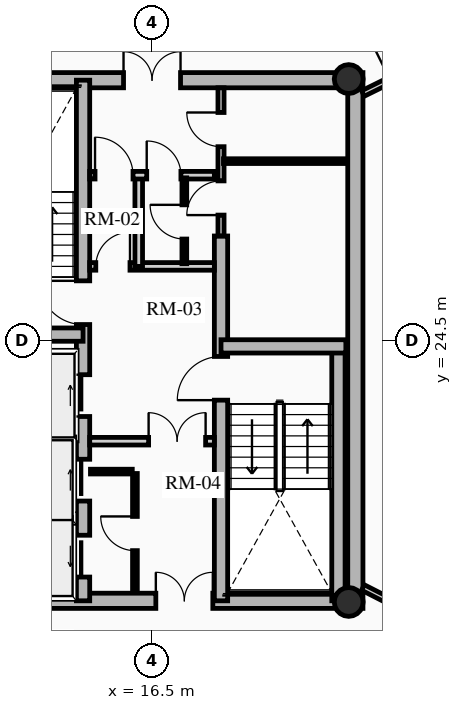
"""IFC4 building model, lengths in metres.
Left out: names, types, materials, properties, quantities, classifications, styles, units other than length and angle.
Written with IfcOpenShell. Run it as: python <this file> out.ifc"""

import sys

from ifc_helpers import new_model, si_unit, direction, frame, frame_2d, origin, origin_2d, place, context, subcontext, project, spatial, rectangle, hollow_circle, extrude, source, transform, mapped, element, fill, save


model = new_model("IFC4")
c1 = context("Model", 3, precision=1e-05, world=origin(), true_north=direction((0.0, 1.0)))
c2 = subcontext(c1, "Body", "Model", "MODEL_VIEW")
j1 = project(units=[si_unit("LENGTHUNIT", "METRE"), si_unit("PLANEANGLEUNIT", "RADIAN")], contexts=[c1])
p1 = place(None, origin())
s1 = spatial("IfcSite", under=j1, at=p1, CompositionType="ELEMENT")
p2 = place(p1, origin())
s2 = spatial("IfcBuilding", under=s1, at=p2, CompositionType="ELEMENT")
p3 = place(p2, frame((0.0, 0.0, 180.7)))
s3 = spatial("IfcBuildingStorey", under=s2, at=p3, CompositionType="ELEMENT", Elevation=180.7)
p4 = place(p3, frame((21.85, 17.45, 0.0), z_axis=(0.0, 0.0, 1.0), x_axis=(0.0, 1.0, 0.0)))
e1 = element("IfcWall", 1, at=p4, inside=s3, PredefinedType="SHEAR", context=c2, shape_type="SweptSolid", body=[
    extrude(rectangle(XDim=14.1, YDim=0.4, at=frame_2d((7.05, 0.0))), origin(), (0.0, 0.0, 1.0), 2.91),
])
p5 = place(p3, frame((11.15, 17.65, 0.0), z_axis=(0.0, 0.0, 1.0), x_axis=(1.0, 0.0, 0.0)))
e2 = element("IfcWall", 2, at=p5, inside=s3, PredefinedType="SHEAR", context=c2, shape_type="SweptSolid", body=[
    extrude(rectangle(XDim=10.7, YDim=0.4, at=frame_2d((5.35, 0.0))), origin(), (0.0, 0.0, 1.0), 2.91),
])
m1 = source(origin(), c2, "Body", "SweptSolid", [
    extrude(rectangle(XDim=1.5, YDim=2.02, at=frame_2d((0.75, 1.01))), frame((0.0, 0.21, 0.0), z_axis=(0.0, -1.0, 0.0), x_axis=(1.0, 0.0, 0.0)), (0.0, 0.0, 1.0), 0.42),
])
p6 = place(p5, frame((5.45, 0.0, 0.0)))
e3 = element("IfcOpeningElement", 3, at=p6, cuts=e2, PredefinedType="OPENING", context=c2, shape_type="MappedRepresentation", body=[
    mapped(m1, transform((0.0, 0.0, 0.0), x_axis=(1.0, 0.0, 0.0), y_axis=(0.0, 1.0, 0.0), z_axis=(0.0, 0.0, 1.0), scale=1.0)),
])
p7 = place(p3, frame((11.15, 31.35, 0.0), z_axis=(0.0, 0.0, 1.0), x_axis=(1.0, 0.0, 0.0)))
e4 = element("IfcWall", 4, at=p7, inside=s3, PredefinedType="SHEAR", context=c2, shape_type="SweptSolid", body=[
    extrude(rectangle(XDim=10.7, YDim=0.4, at=frame_2d((5.35, 0.0))), origin(), (0.0, 0.0, 1.0), 2.91),
])
p8 = place(p7, frame((4.6, 0.0, 0.0)))
e5 = element("IfcOpeningElement", 5, at=p8, cuts=e4, PredefinedType="OPENING", context=c2, shape_type="MappedRepresentation", body=[
    mapped(m1, transform((0.0, 0.0, 0.0), x_axis=(1.0, 0.0, 0.0), y_axis=(0.0, 1.0, 0.0), z_axis=(0.0, 0.0, 1.0), scale=1.0)),
])
p9 = place(p3, frame((14.685, 17.65, 0.0), z_axis=(0.0, 0.0, 1.0), x_axis=(0.0, 1.0, 0.0)))
e6 = element("IfcWall", 6, at=p9, inside=s3, PredefinedType="SHEAR", context=c2, shape_type="SweptSolid", body=[
    extrude(rectangle(XDim=13.7, YDim=0.35, at=frame_2d((6.85, 0.0))), origin(), (0.0, 0.0, 1.0), 2.91),
])
m2 = source(origin(), c2, "Body", "SweptSolid", [
    extrude(rectangle(XDim=1.1, YDim=2.015, at=frame_2d((0.55, 1.007))), frame((0.0, 0.185, 0.0), z_axis=(0.0, -1.0, 0.0), x_axis=(1.0, 0.0, 0.0)), (0.0, 0.0, 1.0), 0.37),
])
p10 = place(p9, frame((4.85, 0.0, 0.0)))
e7 = element("IfcOpeningElement", 7, at=p10, cuts=e6, PredefinedType="OPENING", context=c2, shape_type="MappedRepresentation", body=[
    mapped(m2, transform((0.0, 0.0, 0.0), x_axis=(1.0, 0.0, 0.0), y_axis=(0.0, 1.0, 0.0), z_axis=(0.0, 0.0, 1.0), scale=1.0)),
])
p11 = place(p9, frame((0.625, 0.0, 0.0)))
e8 = element("IfcOpeningElement", 8, at=p11, cuts=e6, PredefinedType="OPENING", context=c2, shape_type="MappedRepresentation", body=[
    mapped(m2, transform((0.0, 0.0, 0.0), x_axis=(1.0, 0.0, 0.0), y_axis=(0.0, 1.0, 0.0), z_axis=(0.0, 0.0, 1.0), scale=1.0)),
])
p12 = place(p9, frame((2.625, 0.0, 0.0)))
e9 = element("IfcOpeningElement", 9, at=p12, cuts=e6, PredefinedType="OPENING", context=c2, shape_type="MappedRepresentation", body=[
    mapped(m2, transform((0.0, 0.0, 0.0), x_axis=(1.0, 0.0, 0.0), y_axis=(0.0, 1.0, 0.0), z_axis=(0.0, 0.0, 1.0), scale=1.0)),
])
m3 = source(origin(), c2, "Body", "SweptSolid", [
    extrude(rectangle(XDim=1.15, YDim=2.02, at=frame_2d((0.575, 1.01))), frame((0.0, 0.185, 0.0), z_axis=(0.0, -1.0, 0.0), x_axis=(1.0, 0.0, 0.0)), (0.0, 0.0, 1.0), 0.37),
])
p13 = place(p9, frame((7.27, 0.0, 0.0)))
e10 = element("IfcOpeningElement", 10, at=p13, cuts=e6, PredefinedType="OPENING", context=c2, shape_type="MappedRepresentation", body=[
    mapped(m3, transform((0.0, 0.0, 0.0), x_axis=(1.0, 0.0, 0.0), y_axis=(0.0, 1.0, 0.0), z_axis=(0.0, 0.0, 1.0), scale=1.0)),
])
p14 = place(p3, frame((18.315, 17.65, 0.0), z_axis=(0.0, 0.0, 1.0), x_axis=(0.0, 1.0, 0.0)))
e11 = element("IfcWall", 11, at=p14, inside=s3, PredefinedType="SHEAR", context=c2, shape_type="SweptSolid", body=[
    extrude(rectangle(XDim=9.6, YDim=0.35, at=frame_2d((4.8, 0.0))), origin(), (0.0, 0.0, 1.0), 2.91),
])
p15 = place(p14, frame((5.28, 0.0, 0.0)))
e12 = element("IfcOpeningElement", 12, at=p15, cuts=e11, PredefinedType="OPENING", context=c2, shape_type="MappedRepresentation", body=[
    mapped(m3, transform((0.0, 0.0, 0.0), x_axis=(1.0, 0.0, 0.0), y_axis=(0.0, 1.0, 0.0), z_axis=(0.0, 0.0, 1.0), scale=1.0)),
])
p16 = place(p3, frame((11.4, 24.655, 0.0), z_axis=(0.0, 0.0, 1.0), x_axis=(1.0, 0.0, 0.0)))
e13 = element("IfcWall", 13, at=p16, inside=s3, PredefinedType="SHEAR", context=c2, shape_type="SweptSolid", body=[
    extrude(rectangle(XDim=3.285, YDim=0.35, at=frame_2d((1.643, 0.0))), origin(), (0.0, 0.0, 1.0), 2.91),
])
p17 = place(p3, frame((21.405, 17.65, 0.0), z_axis=(0.0, 0.0, 1.0), x_axis=(0.0, 1.0, 0.0)))
e14 = element("IfcWall", 14, at=p17, inside=s3, PredefinedType="SHEAR", context=c2, shape_type="SweptSolid", body=[
    extrude(rectangle(XDim=6.695, YDim=0.35, at=frame_2d((3.348, 0.0))), origin(), (0.0, 0.0, 1.0), 2.91),
])
p18 = place(p3, frame((18.315, 24.345, 0.0), z_axis=(0.0, 0.0, 1.0), x_axis=(1.0, 0.0, 0.0)))
e15 = element("IfcWall", 15, at=p18, inside=s3, PredefinedType="SHEAR", context=c2, shape_type="SweptSolid", body=[
    extrude(rectangle(XDim=3.285, YDim=0.35, at=frame_2d((1.643, 0.0))), origin(), (0.0, 0.0, 1.0), 2.91),
])
for number, where, z_axis, x_axis in (
    (16, (21.675, 17.62, 0.0), (0.0, 0.0, 1.0), (1.0, 0.0, 0.0)),
    (17, (21.675, 31.38, 0.0), (0.0, 0.0, 1.0), (1.0, 0.0, 0.0)),
):
    element("IfcColumn", number, at=place(p3, frame(where, z_axis=z_axis, x_axis=x_axis)), inside=s3, PredefinedType="COLUMN", context=c2, shape_type="SweptSolid", body=[
        extrude(hollow_circle(Radius=0.38, WallThickness=0.032, at=origin_2d()), origin(), (0.0, 0.0, 1.0), 2.91),
    ])
for number, where, z_axis, x_axis in (
    (18, (11.52, 21.8, 0.0), (0.0, 0.0, 1.0), (1.0, 0.0, 0.0)),
    (19, (11.52, 19.825, 0.0), (0.0, 0.0, 1.0), (1.0, 0.0, 0.0)),
):
    element("IfcWall", number, at=place(p3, frame(where, z_axis=z_axis, x_axis=x_axis)), inside=s3, PredefinedType="SHEAR", context=c2, shape_type="SweptSolid", body=[
        extrude(rectangle(XDim=2.97, YDim=0.2, at=frame_2d((1.485, 0.0))), origin(), (0.0, 0.0, 1.0), 2.91),
    ])
p19 = place(p3, frame((14.86, 21.85, 0.0), z_axis=(0.0, 0.0, 1.0), x_axis=(1.0, 0.0, 0.0)))
e20 = element("IfcWall", 20, at=p19, inside=s3, PredefinedType="PARTITIONING", context=c2, shape_type="SweptSolid", body=[
    extrude(rectangle(XDim=3.28, YDim=0.2, at=frame_2d((1.64, 0.0))), origin(), (0.0, 0.0, 1.0), 2.675),
])
m4 = source(origin(), c2, "Body", "SweptSolid", [
    extrude(rectangle(XDim=1.5, YDim=2.02, at=frame_2d((0.75, 1.01))), frame((0.0, 0.11, 0.0), z_axis=(0.0, -1.0, 0.0), x_axis=(1.0, 0.0, 0.0)), (0.0, 0.0, 1.0), 0.22),
])
p20 = place(p19, frame((1.55, 0.0, 0.0)))
e21 = element("IfcOpeningElement", 21, at=p20, cuts=e20, PredefinedType="OPENING", context=c2, shape_type="MappedRepresentation", body=[
    mapped(m4, transform((0.0, 0.0, 0.0), x_axis=(1.0, 0.0, 0.0), y_axis=(0.0, 1.0, 0.0), z_axis=(0.0, 0.0, 1.0), scale=1.0)),
])
p21 = place(p3, frame((14.86, 26.45, 0.0), z_axis=(0.0, 0.0, 1.0), x_axis=(1.0, 0.0, 0.0)))
e22 = element("IfcWall", 22, at=p21, inside=s3, PredefinedType="PARTITIONING", context=c2, shape_type="SweptSolid", body=[
    extrude(rectangle(XDim=3.28, YDim=0.2, at=frame_2d((1.64, 0.0))), origin(), (0.0, 0.0, 1.0), 2.675),
])
m5 = source(origin(), c2, "Body", "SweptSolid", [
    extrude(rectangle(XDim=0.9, YDim=2.005, at=frame_2d((0.45, 1.002))), frame((0.0, 0.11, 0.0), z_axis=(0.0, -1.0, 0.0), x_axis=(1.0, 0.0, 0.0)), (0.0, 0.0, 1.0), 0.22),
])
p22 = place(p21, frame((0.16, 0.0, 0.0)))
e23 = element("IfcOpeningElement", 23, at=p22, cuts=e22, PredefinedType="OPENING", context=c2, shape_type="MappedRepresentation", body=[
    mapped(m5, transform((0.0, 0.0, 0.0), x_axis=(1.0, 0.0, 0.0), y_axis=(0.0, 1.0, 0.0), z_axis=(0.0, 0.0, 1.0), scale=1.0)),
])
p23 = place(p3, frame((16.15, 26.45, 0.0), z_axis=(0.0, 0.0, 1.0), x_axis=(0.0, 1.0, 0.0)))
e24 = element("IfcWall", 24, at=p23, inside=s3, PredefinedType="PARTITIONING", context=c2, shape_type="SweptSolid", body=[
    extrude(rectangle(XDim=2.4, YDim=0.2, at=frame_2d((1.2, 0.0))), origin(), (0.0, 0.0, 1.0), 2.675),
])
p24 = place(p3, frame((14.86, 28.85, 0.0), z_axis=(0.0, 0.0, 1.0), x_axis=(1.0, 0.0, 0.0)))
e25 = element("IfcWall", 25, at=p24, inside=s3, PredefinedType="PARTITIONING", context=c2, shape_type="SweptSolid", body=[
    extrude(rectangle(XDim=3.28, YDim=0.2, at=frame_2d((1.64, 0.0))), origin(), (0.0, 0.0, 1.0), 2.675),
])
m6 = source(origin(), c2, "Body", "SweptSolid", [
    extrude(rectangle(XDim=1.0, YDim=2.015, at=frame_2d((0.5, 1.007))), frame((0.0, 0.11, 0.0), z_axis=(0.0, -1.0, 0.0), x_axis=(1.0, 0.0, 0.0)), (0.0, 0.0, 1.0), 0.22),
])
p25 = place(p24, frame((0.14, 0.0, 0.0)))
e26 = element("IfcOpeningElement", 26, at=p25, cuts=e25, PredefinedType="OPENING", context=c2, shape_type="MappedRepresentation", body=[
    mapped(m6, transform((0.0, 0.0, 0.0), x_axis=(1.0, 0.0, 0.0), y_axis=(0.0, 1.0, 0.0), z_axis=(0.0, 0.0, 1.0), scale=1.0)),
])
p26 = place(p24, frame((1.5, 0.0, 0.0)))
e27 = element("IfcOpeningElement", 27, at=p26, cuts=e25, PredefinedType="OPENING", context=c2, shape_type="MappedRepresentation", body=[
    mapped(m5, transform((0.0, 0.0, 0.0), x_axis=(1.0, 0.0, 0.0), y_axis=(0.0, 1.0, 0.0), z_axis=(0.0, 0.0, 1.0), scale=1.0)),
])
p27 = place(p3, frame((16.05, 17.92, 0.0), z_axis=(0.0, 0.0, 1.0), x_axis=(0.0, 1.0, 0.0)))
e28 = element("IfcWall", 28, at=p27, inside=s3, PredefinedType="PARTITIONING", context=c2, shape_type="SweptSolid", body=[
    extrude(rectangle(XDim=3.08, YDim=0.125, at=frame_2d((1.54, 0.0))), origin(), (0.0, 0.0, 1.0), 2.675),
])
m7 = source(origin(), c2, "Body", "SweptSolid", [
    extrude(rectangle(XDim=0.9, YDim=2.005, at=frame_2d((0.45, 1.002))), frame((0.0, 0.073, 0.0), z_axis=(0.0, -1.0, 0.0), x_axis=(1.0, 0.0, 0.0)), (0.0, 0.0, 1.0), 0.145),
])
p28 = place(p27, frame((1.05, 0.0, 0.0)))
e29 = element("IfcOpeningElement", 29, at=p28, cuts=e28, PredefinedType="OPENING", context=c2, shape_type="MappedRepresentation", body=[
    mapped(m7, transform((0.0, 0.0, 0.0), x_axis=(1.0, 0.0, 0.0), y_axis=(0.0, 1.0, 0.0), z_axis=(0.0, 0.0, 1.0), scale=1.0)),
])
p29 = place(p3, frame((14.88, 21.05, 0.0), z_axis=(0.0, 0.0, 1.0), x_axis=(1.0, 0.0, 0.0)))
e30 = element("IfcWall", 30, at=p29, inside=s3, PredefinedType="PARTITIONING", context=c2, shape_type="SweptSolid", body=[
    extrude(rectangle(XDim=1.1, YDim=0.125, at=frame_2d((0.55, 0.0))), origin(), (0.0, 0.0, 1.0), 2.675),
])
p30 = place(p3, frame((17.35, 26.52, 0.0), z_axis=(0.0, 0.0, 1.0), x_axis=(0.0, 1.0, 0.0)))
e31 = element("IfcWall", 31, at=p30, inside=s3, PredefinedType="PARTITIONING", context=c2, shape_type="SweptSolid", body=[
    extrude(rectangle(XDim=2.26, YDim=0.125, at=frame_2d((1.13, 0.0))), origin(), (0.0, 0.0, 1.0), 2.675),
])
p31 = place(p30, frame((0.65, 0.0, 0.0)))
e32 = element("IfcOpeningElement", 32, at=p31, cuts=e31, PredefinedType="OPENING", context=c2, shape_type="MappedRepresentation", body=[
    mapped(m7, transform((0.0, 0.0, 0.0), x_axis=(1.0, 0.0, 0.0), y_axis=(0.0, 1.0, 0.0), z_axis=(0.0, 0.0, 1.0), scale=1.0)),
])
p32 = place(p3, frame((18.315, 27.25, 0.0), z_axis=(0.0, 0.0, 1.0), x_axis=(0.0, 1.0, 0.0)))
e33 = element("IfcWall", 33, at=p32, inside=s3, PredefinedType="PARTITIONING", context=c2, shape_type="SweptSolid", body=[
    extrude(rectangle(XDim=3.9, YDim=0.16, at=frame_2d((1.95, 0.0))), origin(), (0.0, 0.0, 1.0), 2.675),
])
m8 = source(origin(), c2, "Body", "SweptSolid", [
    extrude(rectangle(XDim=0.9, YDim=2.005, at=frame_2d((0.45, 1.002))), frame((0.0, 0.09, 0.0), z_axis=(0.0, -1.0, 0.0), x_axis=(1.0, 0.0, 0.0)), (0.0, 0.0, 1.0), 0.18),
])
p33 = place(p32, frame((0.55, 0.0, 0.0)))
e34 = element("IfcOpeningElement", 34, at=p33, cuts=e33, PredefinedType="OPENING", context=c2, shape_type="MappedRepresentation", body=[
    mapped(m8, transform((0.0, 0.0, 0.0), x_axis=(1.0, 0.0, 0.0), y_axis=(0.0, 1.0, 0.0), z_axis=(0.0, 0.0, 1.0), scale=1.0)),
])
p34 = place(p32, frame((2.35, 0.0, 0.0)))
e35 = element("IfcOpeningElement", 35, at=p34, cuts=e33, PredefinedType="OPENING", context=c2, shape_type="MappedRepresentation", body=[
    mapped(m8, transform((0.0, 0.0, 0.0), x_axis=(1.0, 0.0, 0.0), y_axis=(0.0, 1.0, 0.0), z_axis=(0.0, 0.0, 1.0), scale=1.0)),
])
p35 = place(p3, frame((18.38, 29.22, 0.0), z_axis=(0.0, 0.0, 1.0), x_axis=(1.0, 0.0, 0.0)))
e36 = element("IfcWall", 36, at=p35, inside=s3, PredefinedType="PARTITIONING", context=c2, shape_type="SweptSolid", body=[
    extrude(rectangle(XDim=3.22, YDim=0.125, at=frame_2d((1.61, 0.0))), origin(), (0.0, 0.0, 1.0), 2.212),
])
p36 = place(p3, frame((22.05, 31.0, 0.0), z_axis=(0.0, 0.0, 1.0), x_axis=(0.896798317999, 0.442439574218, 0.0)))
e37 = element("IfcWall", 37, at=p36, inside=s3, PredefinedType="PARTITIONING", context=c2, shape_type="SweptSolid", body=[
    extrude(rectangle(XDim=2.048, YDim=0.16, at=frame_2d((1.024, 0.0))), origin(), (0.0, 0.0, 1.0), 2.245),
])
m9 = source(origin(), c2, "Body", "SweptSolid", [
    extrude(rectangle(XDim=1.05, YDim=2.015, at=frame_2d((0.525, 1.007))), frame((0.0, 0.09, 0.0), z_axis=(0.0, -1.0, 0.0), x_axis=(1.0, 0.0, 0.0)), (0.0, 0.0, 1.0), 0.18),
])
p37 = place(p36, frame((0.798, 0.0, 0.0)))
e38 = element("IfcOpeningElement", 38, at=p37, cuts=e37, PredefinedType="OPENING", context=c2, shape_type="MappedRepresentation", body=[
    mapped(m9, transform((0.0, 0.0, 0.0), x_axis=(1.0, 0.0, 0.0), y_axis=(0.0, 1.0, 0.0), z_axis=(0.0, 0.0, 1.0), scale=1.0)),
])
p38 = place(p3, frame((22.05, 18.0, 0.0), z_axis=(0.0, 0.0, 1.0), x_axis=(0.890660222535, -0.454669515136, 0.0)))
e39 = element("IfcWall", 39, at=p38, inside=s3, PredefinedType="PARTITIONING", context=c2, shape_type="SweptSolid", body=[
    extrude(rectangle(XDim=2.144, YDim=0.16, at=frame_2d((1.072, 0.0))), origin(), (0.0, 0.0, 1.0), 2.245),
])
p39 = place(p38, frame((0.894, 0.0, 0.0)))
e40 = element("IfcOpeningElement", 40, at=p39, cuts=e39, PredefinedType="OPENING", context=c2, shape_type="MappedRepresentation", body=[
    mapped(m9, transform((0.0, 0.0, 0.0), x_axis=(1.0, 0.0, 0.0), y_axis=(0.0, 1.0, 0.0), z_axis=(0.0, 0.0, 1.0), scale=1.0)),
])
m10 = source(origin(), c2, "Body", "SweptSolid", [
    extrude(rectangle(XDim=1.1, YDim=2.015, at=frame_2d((0.55, 1.007))), frame((0.0, 0.025, 0.0), z_axis=(0.0, -1.0, 0.0), x_axis=(1.0, 0.0, 0.0)), (0.0, 0.0, 1.0), 0.05),
])
p40 = place(p10, origin())
e41 = element("IfcDoor", 41, at=p40, inside=s3, OperationType="SLIDING_TO_RIGHT", PredefinedType="DOOR", context=c2, shape_type="MappedRepresentation", body=[
    mapped(m10, transform((0.0, 0.0, 0.0), x_axis=(1.0, 0.0, 0.0), y_axis=(0.0, 1.0, 0.0), z_axis=(0.0, 0.0, 1.0), scale=1.0)),
])
fill(e7, e41)
p41 = place(p11, origin())
e42 = element("IfcDoor", 42, at=p41, inside=s3, OperationType="SLIDING_TO_LEFT", PredefinedType="DOOR", context=c2, shape_type="MappedRepresentation", body=[
    mapped(m10, transform((0.0, 0.0, 0.0), x_axis=(1.0, 0.0, 0.0), y_axis=(0.0, 1.0, 0.0), z_axis=(0.0, 0.0, 1.0), scale=1.0)),
])
fill(e8, e42)
p42 = place(p12, origin())
e43 = element("IfcDoor", 43, at=p42, inside=s3, OperationType="SLIDING_TO_RIGHT", PredefinedType="DOOR", context=c2, shape_type="MappedRepresentation", body=[
    mapped(m10, transform((0.0, 0.0, 0.0), x_axis=(1.0, 0.0, 0.0), y_axis=(0.0, 1.0, 0.0), z_axis=(0.0, 0.0, 1.0), scale=1.0)),
])
fill(e9, e43)
m11 = source(origin(), c2, "Body", "SweptSolid", [
    extrude(rectangle(XDim=1.15, YDim=2.02, at=frame_2d((0.575, 1.01))), frame((0.0, 0.025, 0.0), z_axis=(0.0, -1.0, 0.0), x_axis=(1.0, 0.0, 0.0)), (0.0, 0.0, 1.0), 0.05),
])
p43 = place(p13, origin())
e44 = element("IfcDoor", 44, at=p43, inside=s3, OperationType="SINGLE_SWING_RIGHT", PredefinedType="DOOR", context=c2, shape_type="MappedRepresentation", body=[
    mapped(m11, transform((0.0, 0.0, 0.0), x_axis=(1.0, 0.0, 0.0), y_axis=(0.0, 1.0, 0.0), z_axis=(0.0, 0.0, 1.0), scale=1.0)),
])
fill(e10, e44)
p44 = place(p15, origin())
e45 = element("IfcDoor", 45, at=p44, inside=s3, OperationType="SINGLE_SWING_LEFT", PredefinedType="DOOR", context=c2, shape_type="MappedRepresentation", body=[
    mapped(m11, transform((0.0, 0.0, 0.0), x_axis=(1.0, 0.0, 0.0), y_axis=(0.0, 1.0, 0.0), z_axis=(0.0, 0.0, 1.0), scale=1.0)),
])
fill(e12, e45)
m12 = source(origin(), c2, "Body", "SweptSolid", [
    extrude(rectangle(XDim=1.5, YDim=2.02, at=frame_2d((0.75, 1.01))), frame((0.0, 0.025, 0.0), z_axis=(0.0, -1.0, 0.0), x_axis=(1.0, 0.0, 0.0)), (0.0, 0.0, 1.0), 0.05),
])
p45 = place(p8, origin())
e46 = element("IfcDoor", 46, at=p45, inside=s3, OperationType="DOUBLE_DOOR_SINGLE_SWING", PredefinedType="DOOR", context=c2, shape_type="MappedRepresentation", body=[
    mapped(m12, transform((0.0, 0.0, 0.0), x_axis=(1.0, 0.0, 0.0), y_axis=(0.0, 1.0, 0.0), z_axis=(0.0, 0.0, 1.0), scale=1.0)),
])
fill(e5, e46)
p46 = place(p6, origin())
e47 = element("IfcDoor", 47, at=p46, inside=s3, OperationType="DOUBLE_DOOR_SINGLE_SWING", PredefinedType="DOOR", context=c2, shape_type="MappedRepresentation", body=[
    mapped(m12, transform((0.0, 0.0, 0.0), x_axis=(1.0, 0.0, 0.0), y_axis=(0.0, 1.0, 0.0), z_axis=(0.0, 0.0, 1.0), scale=1.0)),
])
fill(e3, e47)
p47 = place(p20, origin())
e48 = element("IfcDoor", 48, at=p47, inside=s3, OperationType="DOUBLE_DOOR_SINGLE_SWING", PredefinedType="DOOR", context=c2, shape_type="MappedRepresentation", body=[
    mapped(m12, transform((0.0, 0.0, 0.0), x_axis=(1.0, 0.0, 0.0), y_axis=(0.0, 1.0, 0.0), z_axis=(0.0, 0.0, 1.0), scale=1.0)),
])
fill(e21, e48)
m13 = source(origin(), c2, "Body", "SweptSolid", [
    extrude(rectangle(XDim=0.9, YDim=2.005, at=frame_2d((0.45, 1.002))), frame((0.0, 0.025, 0.0), z_axis=(0.0, -1.0, 0.0), x_axis=(1.0, 0.0, 0.0)), (0.0, 0.0, 1.0), 0.05),
])
p48 = place(p22, origin())
e49 = element("IfcDoor", 49, at=p48, inside=s3, OperationType="SINGLE_SWING_RIGHT", PredefinedType="DOOR", context=c2, shape_type="MappedRepresentation", body=[
    mapped(m13, transform((0.0, 0.0, 0.0), x_axis=(1.0, 0.0, 0.0), y_axis=(0.0, 1.0, 0.0), z_axis=(0.0, 0.0, 1.0), scale=1.0)),
])
fill(e23, e49)
m14 = source(origin(), c2, "Body", "SweptSolid", [
    extrude(rectangle(XDim=1.0, YDim=2.015, at=frame_2d((0.5, 1.007))), frame((0.0, 0.025, 0.0), z_axis=(0.0, -1.0, 0.0), x_axis=(1.0, 0.0, 0.0)), (0.0, 0.0, 1.0), 0.05),
])
p49 = place(p25, origin())
e50 = element("IfcDoor", 50, at=p49, inside=s3, OperationType="SINGLE_SWING_LEFT", PredefinedType="DOOR", context=c2, shape_type="MappedRepresentation", body=[
    mapped(m14, transform((0.0, 0.0, 0.0), x_axis=(1.0, 0.0, 0.0), y_axis=(0.0, 1.0, 0.0), z_axis=(0.0, 0.0, 1.0), scale=1.0)),
])
fill(e26, e50)
p50 = place(p28, origin())
e51 = element("IfcDoor", 51, at=p50, inside=s3, OperationType="SINGLE_SWING_RIGHT", PredefinedType="DOOR", context=c2, shape_type="MappedRepresentation", body=[
    mapped(m13, transform((0.0, 0.0, 0.0), x_axis=(1.0, 0.0, 0.0), y_axis=(0.0, 1.0, 0.0), z_axis=(0.0, 0.0, 1.0), scale=1.0)),
])
fill(e29, e51)
p51 = place(p26, origin())
e52 = element("IfcDoor", 52, at=p51, inside=s3, OperationType="SINGLE_SWING_LEFT", PredefinedType="DOOR", context=c2, shape_type="MappedRepresentation", body=[
    mapped(m13, transform((0.0, 0.0, 0.0), x_axis=(1.0, 0.0, 0.0), y_axis=(0.0, 1.0, 0.0), z_axis=(0.0, 0.0, 1.0), scale=1.0)),
])
fill(e27, e52)
p52 = place(p31, origin())
e53 = element("IfcDoor", 53, at=p52, inside=s3, OperationType="SINGLE_SWING_RIGHT", PredefinedType="DOOR", context=c2, shape_type="MappedRepresentation", body=[
    mapped(m13, transform((0.0, 0.0, 0.0), x_axis=(1.0, 0.0, 0.0), y_axis=(0.0, 1.0, 0.0), z_axis=(0.0, 0.0, 1.0), scale=1.0)),
])
fill(e32, e53)
p53 = place(p33, origin())
e54 = element("IfcDoor", 54, at=p53, inside=s3, OperationType="SINGLE_SWING_LEFT", PredefinedType="DOOR", context=c2, shape_type="MappedRepresentation", body=[
    mapped(m13, transform((0.0, 0.0, 0.0), x_axis=(1.0, 0.0, 0.0), y_axis=(0.0, 1.0, 0.0), z_axis=(0.0, 0.0, 1.0), scale=1.0)),
])
fill(e34, e54)
p54 = place(p34, origin())
e55 = element("IfcDoor", 55, at=p54, inside=s3, OperationType="SINGLE_SWING_RIGHT", PredefinedType="DOOR", context=c2, shape_type="MappedRepresentation", body=[
    mapped(m13, transform((0.0, 0.0, 0.0), x_axis=(1.0, 0.0, 0.0), y_axis=(0.0, 1.0, 0.0), z_axis=(0.0, 0.0, 1.0), scale=1.0)),
])
fill(e35, e55)
save(model, sys.argv[1])
